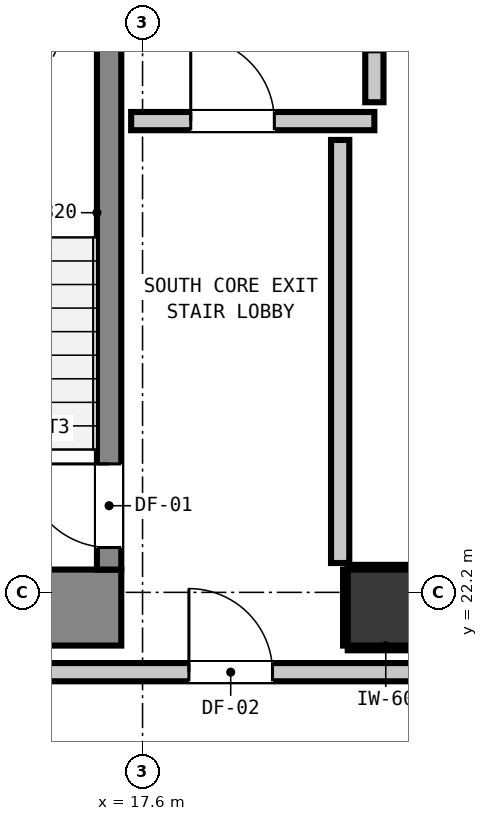
"""IFC4 building model, lengths in metres.
Left out: names, types, materials, properties, quantities, classifications, styles, units other than length and angle.
Written with IfcOpenShell. Run it as: python <this file> out.ifc"""

import sys

from ifc_helpers import new_model, si_unit, direction, frame, frame_2d, origin, origin_2d, place, context, subcontext, project, spatial, rectangle, extrude, element, fill, save


model = new_model("IFC4")
c1 = context("Model", 3, precision=1e-05, world=origin(), true_north=direction((0.0, 1.0)))
c2 = subcontext(c1, "Body", "Model", "MODEL_VIEW")
j1 = project(units=[si_unit("LENGTHUNIT", "METRE"), si_unit("PLANEANGLEUNIT", "RADIAN")], contexts=[c1])
p1 = place(None, origin())
s1 = spatial("IfcSite", under=j1, at=p1, CompositionType="ELEMENT")
p2 = place(p1, origin())
s2 = spatial("IfcBuilding", under=s1, at=p2, CompositionType="ELEMENT")
p3 = place(p2, frame((0.0, 0.0, 119.36)))
s3 = spatial("IfcBuildingStorey", under=s2, at=p3, CompositionType="ELEMENT", Elevation=119.36)
p4 = place(p3, frame((20.8, 22.0, 0.0), z_axis=(0.0, 0.0, 1.0), x_axis=(1.0, 0.0, 0.0)))
e1 = element("IfcColumn", 1, at=p4, inside=s3, PredefinedType="COLUMN", context=c2, shape_type="SweptSolid", body=[
    extrude(rectangle(XDim=1.0, YDim=1.0, at=origin_2d()), origin(), (0.0, 0.0, 1.0), 3.32),
])
p5 = place(p3, frame((13.24, 22.0, 0.0), z_axis=(0.0, 0.0, 1.0), x_axis=(1.0, 0.0, 0.0)))
e2 = element("IfcWall", 2, at=p5, inside=s3, PredefinedType="SHEAR", context=c2, shape_type="SweptSolid", body=[
    extrude(rectangle(XDim=4.08, YDim=1.0, at=frame_2d((2.04, 0.0))), origin(), (0.0, 0.0, 1.0), 3.32),
])
p6 = place(p3, frame((17.16, 22.5, 0.0), z_axis=(0.0, 0.0, 1.0), x_axis=(0.0, 1.0, 0.0)))
e3 = element("IfcWall", 3, at=p6, inside=s3, PredefinedType="SHEAR", context=c2, shape_type="SweptSolid", body=[
    extrude(rectangle(XDim=7.9, YDim=0.32, at=frame_2d((3.95, 0.0))), origin(), (0.0, 0.0, 1.0), 3.32),
])
p7 = place(p6, frame((0.29, 0.0, 0.0)))
e4 = element("IfcOpeningElement", 4, at=p7, cuts=e3, PredefinedType="OPENING", context=c2, shape_type="SweptSolid", body=[
    extrude(rectangle(XDim=1.1, YDim=2.15, at=frame_2d((0.55, 1.075))), frame((0.0, 0.17, 0.0), z_axis=(0.0, -1.0, 0.0), x_axis=(1.0, 0.0, 0.0)), (0.0, 0.0, 1.0), 0.34),
])
p8 = place(p3, frame((3.207, 21.15, 0.0), z_axis=(0.0, 0.0, 1.0), x_axis=(1.0, 0.0, 0.0)))
e5 = element("IfcWall", 5, at=p8, inside=s3, PredefinedType="PARTITIONING", context=c2, shape_type="SweptSolid", body=[
    extrude(rectangle(XDim=39.386, YDim=0.24, at=frame_2d((19.693, 0.0))), origin(), (0.0, 0.0, 1.0), 3.08),
])
p9 = place(p8, frame((15.003, 0.0, 0.0)))
e6 = element("IfcOpeningElement", 6, at=p9, cuts=e5, PredefinedType="OPENING", context=c2, shape_type="SweptSolid", body=[
    extrude(rectangle(XDim=1.1, YDim=2.15, at=frame_2d((0.55, 1.075))), frame((0.0, 0.13, 0.0), z_axis=(0.0, -1.0, 0.0), x_axis=(1.0, 0.0, 0.0)), (0.0, 0.0, 1.0), 0.26),
])
p10 = place(p8, frame((7.243, 0.0, 0.0)))
e7 = element("IfcOpeningElement", 7, at=p10, cuts=e5, PredefinedType="OPENING", context=c2, shape_type="SweptSolid", body=[
    extrude(rectangle(XDim=1.4, YDim=2.15, at=frame_2d((0.7, 1.075))), frame((0.0, 0.13, 0.0), z_axis=(0.0, -1.0, 0.0), x_axis=(1.0, 0.0, 0.0)), (0.0, 0.0, 1.0), 0.26),
])
p11 = place(p8, frame((34.843, 0.0, 0.0)))
e8 = element("IfcOpeningElement", 8, at=p11, cuts=e5, PredefinedType="OPENING", context=c2, shape_type="SweptSolid", body=[
    extrude(rectangle(XDim=1.4, YDim=2.15, at=frame_2d((0.7, 1.075))), frame((0.0, 0.13, 0.0), z_axis=(0.0, -1.0, 0.0), x_axis=(1.0, 0.0, 0.0)), (0.0, 0.0, 1.0), 0.26),
])
p12 = place(p8, frame((3.042, 0.0, 0.0)))
e9 = element("IfcOpeningElement", 9, at=p12, cuts=e5, PredefinedType="OPENING", context=c2, shape_type="SweptSolid", body=[
    extrude(rectangle(XDim=0.9, YDim=2.1, at=frame_2d((0.45, 1.05))), frame((0.0, 0.13, 0.0), z_axis=(0.0, -1.0, 0.0), x_axis=(1.0, 0.0, 0.0)), (0.0, 0.0, 1.0), 0.26),
])
p13 = place(p3, frame((17.45, 28.4, 0.0), z_axis=(0.0, 0.0, 1.0), x_axis=(1.0, 0.0, 0.0)))
e10 = element("IfcWall", 10, at=p13, inside=s3, PredefinedType="PARTITIONING", context=c2, shape_type="SweptSolid", body=[
    extrude(rectangle(XDim=3.2, YDim=0.24, at=frame_2d((1.6, 0.0))), origin(), (0.0, 0.0, 1.0), 3.08),
])
p14 = place(p13, frame((0.784, 0.0, 0.0)))
e11 = element("IfcOpeningElement", 11, at=p14, cuts=e10, PredefinedType="OPENING", context=c2, shape_type="SweptSolid", body=[
    extrude(rectangle(XDim=1.1, YDim=2.15, at=frame_2d((0.55, 1.075))), frame((0.0, 0.13, 0.0), z_axis=(0.0, -1.0, 0.0), x_axis=(1.0, 0.0, 0.0)), (0.0, 0.0, 1.0), 0.26),
])
p15 = place(p3, frame((20.2, 22.586, 0.0), z_axis=(0.0, 0.0, 1.0), x_axis=(0.0, 1.0, 0.0)))
e12 = element("IfcWall", 12, at=p15, inside=s3, PredefinedType="PARTITIONING", context=c2, shape_type="SweptSolid", body=[
    extrude(rectangle(XDim=5.566, YDim=0.24, at=frame_2d((2.783, 0.0))), origin(), (0.0, 0.0, 1.0), 3.08),
])
p16 = place(p3, frame((20.65, 28.648, 0.0), z_axis=(0.0, 0.0, 1.0), x_axis=(0.0, 1.0, 0.0)))
e13 = element("IfcWall", 13, at=p16, inside=s3, PredefinedType="PARTITIONING", context=c2, shape_type="SweptSolid", body=[
    extrude(rectangle(XDim=0.684, YDim=0.24, at=frame_2d((0.342, 0.0))), origin(), (0.0, 0.0, 1.0), 2.315),
])
for number, where, z_axis, x_axis in (
    (14, (20.3, 21.468, 0.0), (0.0, 0.0, 1.0), (1.0, 0.0, 0.0)),
    (15, (20.3, 22.532, 0.0), (0.0, 0.0, 1.0), (1.0, 0.0, 0.0)),
    (16, (20.268, 21.5, 0.0), (0.0, 0.0, 1.0), (0.0, 1.0, 0.0)),
):
    element("IfcWall", number, at=place(p3, frame(where, z_axis=z_axis, x_axis=x_axis)), inside=s3, PredefinedType="PARTITIONING", context=c2, shape_type="SweptSolid", body=[
        extrude(rectangle(XDim=1.0, YDim=0.06, at=frame_2d((0.5, 0.0))), origin(), (0.0, 0.0, 1.0), 1.45),
    ])
p17 = place(p7, origin())
e17 = element("IfcDoor", 17, at=p17, inside=s3, OperationType="SINGLE_SWING_RIGHT", PredefinedType="DOOR", context=c2, shape_type="SweptSolid", body=[
    extrude(rectangle(XDim=1.1, YDim=2.15, at=frame_2d((0.55, 1.075))), frame((0.0, 0.025, 0.0), z_axis=(0.0, -1.0, 0.0), x_axis=(1.0, 0.0, 0.0)), (0.0, 0.0, 1.0), 0.05),
])
fill(e4, e17)
p18 = place(p14, origin())
e18 = element("IfcDoor", 18, at=p18, inside=s3, OperationType="SINGLE_SWING_LEFT", PredefinedType="DOOR", context=c2, shape_type="SweptSolid", body=[
    extrude(rectangle(XDim=1.1, YDim=2.15, at=frame_2d((0.55, 1.075))), frame((0.0, 0.025, 0.0), z_axis=(0.0, -1.0, 0.0), x_axis=(1.0, 0.0, 0.0)), (0.0, 0.0, 1.0), 0.05),
])
fill(e11, e18)
p19 = place(p9, origin())
e19 = element("IfcDoor", 19, at=p19, inside=s3, OperationType="SINGLE_SWING_LEFT", PredefinedType="DOOR", context=c2, shape_type="SweptSolid", body=[
    extrude(rectangle(XDim=1.1, YDim=2.15, at=frame_2d((0.55, 1.075))), frame((0.0, 0.025, 0.0), z_axis=(0.0, -1.0, 0.0), x_axis=(1.0, 0.0, 0.0)), (0.0, 0.0, 1.0), 0.05),
])
fill(e6, e19)
save(model, sys.argv[1])
